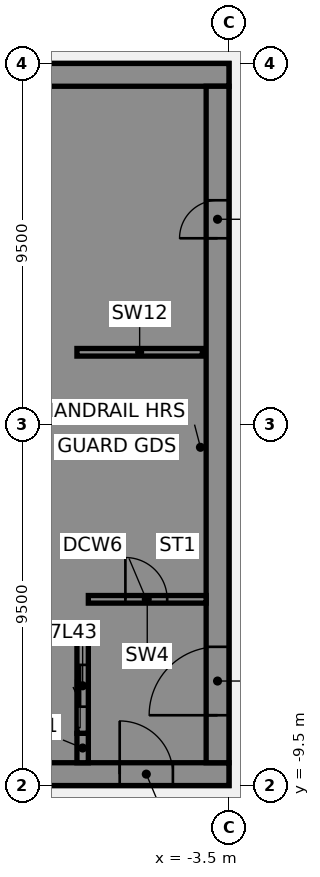
"""IFC4 building model, lengths in metres.
Left out: names, types, materials, properties, quantities, classifications, styles, units other than length and angle.
Written with IfcOpenShell. Run it as: python <this file> out.ifc"""

import sys

from ifc_helpers import new_model, si_unit, direction, frame, frame_2d, origin, place, context, subcontext, project, spatial, polyline, rectangle, outline, extrude, element, fill, save


model = new_model("IFC4")
c1 = context("Model", 3, precision=1e-05, world=origin(), true_north=direction((0.0, 1.0)))
c2 = subcontext(c1, "Body", "Model", "MODEL_VIEW")
j1 = project(units=[si_unit("LENGTHUNIT", "METRE"), si_unit("PLANEANGLEUNIT", "RADIAN")], contexts=[c1])
p1 = place(None, origin())
s1 = spatial("IfcSite", under=j1, at=p1, CompositionType="ELEMENT")
p2 = place(p1, origin())
s2 = spatial("IfcBuilding", under=s1, at=p2, CompositionType="ELEMENT")
p3 = place(p2, frame((0.0, 0.0, 174.25)))
s3 = spatial("IfcBuildingStorey", under=s2, at=p3, CompositionType="ELEMENT", Elevation=174.25)
p4 = place(p3, frame((-16.5, -9.2, 0.0), z_axis=(0.0, 0.0, 1.0), x_axis=(1.0, 0.0, 0.0)))
e1 = element("IfcWall", 1, at=p4, inside=s3, PredefinedType="SHEAR", context=c2, shape_type="SweptSolid", body=[
    extrude(rectangle(XDim=13.0, YDim=0.6, at=frame_2d((6.5, 0.0))), origin(), (0.0, 0.0, 1.0), 3.57),
])
p5 = place(p4, frame((4.15, 0.0, 0.0)))
e2 = element("IfcOpeningElement", 2, at=p5, cuts=e1, PredefinedType="OPENING", context=c2, shape_type="SweptSolid", body=[
    extrude(rectangle(XDim=1.4, YDim=2.1, at=frame_2d((0.7, 1.05))), frame((0.0, 0.31, 0.0), z_axis=(0.0, -1.0, 0.0), x_axis=(1.0, 0.0, 0.0)), (0.0, 0.0, 1.0), 0.62),
])
p6 = place(p4, frame((10.125, 0.0, 0.0)))
e3 = element("IfcOpeningElement", 3, at=p6, cuts=e1, PredefinedType="OPENING", context=c2, shape_type="SweptSolid", body=[
    extrude(rectangle(XDim=1.4, YDim=2.1, at=frame_2d((0.7, 1.05))), frame((0.0, 0.31, 0.0), z_axis=(0.0, -1.0, 0.0), x_axis=(1.0, 0.0, 0.0)), (0.0, 0.0, 1.0), 0.62),
])
p7 = place(p3, frame((-16.5, 9.2, 0.0), z_axis=(0.0, 0.0, 1.0), x_axis=(1.0, 0.0, 0.0)))
e4 = element("IfcWall", 4, at=p7, inside=s3, PredefinedType="SHEAR", context=c2, shape_type="SweptSolid", body=[
    extrude(rectangle(XDim=13.0, YDim=0.6, at=frame_2d((6.5, 0.0))), origin(), (0.0, 0.0, 1.0), 3.57),
])
p8 = place(p3, origin())
e5 = element("IfcWall", 5, at=p8, inside=s3, PredefinedType="SHEAR", context=c2, shape_type="SweptSolid", body=[
    extrude(outline(polyline([(-9.8, -5.375), (-9.8, -5.625), (-7.5, -5.625), (-7.2, -5.625), (-7.2, 8.9), (-7.5, 8.9), (-9.8, 8.9), (-9.8, 8.125), (-7.5, 8.125), (-7.5, 5.625), (-9.8, 5.625), (-9.8, 5.375), (-7.5, 5.375), (-7.5, 2.875), (-9.8, 2.875), (-9.8, 2.625), (-7.5, 2.625), (-7.5, 0.125), (-9.8, 0.125), (-9.8, -0.125), (-7.5, -0.125), (-7.5, -2.625), (-9.8, -2.625), (-9.8, -2.875), (-7.5, -2.875), (-7.5, -5.375), (-9.8, -5.375)])), origin(), (0.0, 0.0, 1.0), 3.57),
])
p9 = place(p3, origin())
e6 = element("IfcWall", 6, at=p9, inside=s3, PredefinedType="SHEAR", context=c2, shape_type="SweptSolid", body=[
    extrude(outline(polyline([(-7.5, -8.125), (-9.55, -8.125), (-9.55, -5.625), (-9.8, -5.625), (-9.8, -8.125), (-9.8, -8.9), (-7.5, -8.9), (-7.5, -8.125)])), origin(), (0.0, 0.0, 1.0), 3.57),
])
p10 = place(p3, frame((-7.35, -8.9, 0.0), z_axis=(0.0, 0.0, 1.0), x_axis=(0.0, 1.0, 0.0)))
e7 = element("IfcWall", 7, at=p10, inside=s3, PredefinedType="SHEAR", context=c2, shape_type="SweptSolid", body=[
    extrude(rectangle(XDim=0.775, YDim=0.3, at=frame_2d((0.387, 0.0))), origin(), (0.0, 0.0, 1.0), 3.57),
])
p11 = place(p3, frame((-7.5, 1.9, 0.0), z_axis=(0.0, 0.0, 1.0), x_axis=(1.0, 0.0, 0.0)))
e8 = element("IfcWall", 8, at=p11, inside=s3, PredefinedType="SHEAR", context=c2, shape_type="SweptSolid", body=[
    extrude(rectangle(XDim=3.3, YDim=0.2, at=frame_2d((1.65, 0.0))), origin(), (0.0, 0.0, 1.0), 3.57),
])
p12 = place(p3, frame((-7.35, -8.125, 0.0), z_axis=(0.0, 0.0, 1.0), x_axis=(0.0, 1.0, 0.0)))
e9 = element("IfcWall", 9, at=p12, inside=s3, PredefinedType="SHEAR", context=c2, shape_type="SweptSolid", body=[
    extrude(rectangle(XDim=2.5, YDim=0.3, at=frame_2d((1.25, 0.0))), origin(), (0.0, 0.0, 1.0), 3.57),
])
p13 = place(p12, frame((0.7, 0.0, 0.0)))
e10 = element("IfcOpeningElement", 10, at=p13, cuts=e9, PredefinedType="OPENING", context=c2, shape_type="SweptSolid", body=[
    extrude(rectangle(XDim=1.1, YDim=2.1, at=frame_2d((0.55, 1.05))), frame((0.0, 0.16, 0.0), z_axis=(0.0, -1.0, 0.0), x_axis=(1.0, 0.0, 0.0)), (0.0, 0.0, 1.0), 0.32),
])
p14 = place(p3, frame((-3.8, -8.9, 0.0), z_axis=(0.0, 0.0, 1.0), x_axis=(0.0, 1.0, 0.0)))
e11 = element("IfcWall", 11, at=p14, inside=s3, PredefinedType="SHEAR", context=c2, shape_type="SweptSolid", body=[
    extrude(rectangle(XDim=17.8, YDim=0.6, at=frame_2d((8.9, 0.0))), origin(), (0.0, 0.0, 1.0), 3.57),
])
p15 = place(p14, frame((1.25, 0.0, 0.0)))
e12 = element("IfcOpeningElement", 12, at=p15, cuts=e11, PredefinedType="OPENING", context=c2, shape_type="SweptSolid", body=[
    extrude(rectangle(XDim=1.8, YDim=2.1, at=frame_2d((0.9, 1.05))), frame((0.0, 0.31, 0.0), z_axis=(0.0, -1.0, 0.0), x_axis=(1.0, 0.0, 0.0)), (0.0, 0.0, 1.0), 0.62),
])
p16 = place(p14, frame((13.8, 0.0, 0.0)))
e13 = element("IfcOpeningElement", 13, at=p16, cuts=e11, PredefinedType="OPENING", context=c2, shape_type="SweptSolid", body=[
    extrude(rectangle(XDim=1.0, YDim=2.1, at=frame_2d((0.5, 1.05))), frame((0.0, 0.31, 0.0), z_axis=(0.0, -1.0, 0.0), x_axis=(1.0, 0.0, 0.0)), (0.0, 0.0, 1.0), 0.62),
])
p17 = place(p3, frame((-7.2, -4.6, 0.0), z_axis=(0.0, 0.0, 1.0), x_axis=(1.0, 0.0, 0.0)))
e14 = element("IfcWall", 14, at=p17, inside=s3, PredefinedType="SHEAR", context=c2, shape_type="SweptSolid", body=[
    extrude(rectangle(XDim=3.1, YDim=0.2, at=frame_2d((1.55, 0.0))), origin(), (0.0, 0.0, 1.0), 3.57),
])
p18 = place(p17, frame((0.975, 0.0, 0.0)))
e15 = element("IfcOpeningElement", 15, at=p18, cuts=e14, PredefinedType="OPENING", context=c2, shape_type="SweptSolid", body=[
    extrude(rectangle(XDim=1.1, YDim=2.1, at=frame_2d((0.55, 1.05))), frame((0.0, 0.11, 0.0), z_axis=(0.0, -1.0, 0.0), x_axis=(1.0, 0.0, 0.0)), (0.0, 0.0, 1.0), 0.22),
])
p19 = place(p6, origin())
e16 = element("IfcDoor", 16, at=p19, inside=s3, OperationType="SINGLE_SWING_LEFT", PredefinedType="DOOR", context=c2, shape_type="SweptSolid", body=[
    extrude(rectangle(XDim=1.4, YDim=2.1, at=frame_2d((0.7, 1.05))), frame((0.0, 0.025, 0.0), z_axis=(0.0, -1.0, 0.0), x_axis=(1.0, 0.0, 0.0)), (0.0, 0.0, 1.0), 0.05),
])
fill(e3, e16)
p20 = place(p15, origin())
e17 = element("IfcDoor", 17, at=p20, inside=s3, OperationType="SINGLE_SWING_LEFT", PredefinedType="DOOR", context=c2, shape_type="SweptSolid", body=[
    extrude(rectangle(XDim=1.8, YDim=2.1, at=frame_2d((0.9, 1.05))), frame((0.0, 0.025, 0.0), z_axis=(0.0, -1.0, 0.0), x_axis=(1.0, 0.0, 0.0)), (0.0, 0.0, 1.0), 0.05),
])
fill(e12, e17)
p21 = place(p16, origin())
e18 = element("IfcDoor", 18, at=p21, inside=s3, OperationType="SINGLE_SWING_LEFT", PredefinedType="DOOR", context=c2, shape_type="SweptSolid", body=[
    extrude(rectangle(XDim=1.0, YDim=2.1, at=frame_2d((0.5, 1.05))), frame((0.0, 0.025, 0.0), z_axis=(0.0, -1.0, 0.0), x_axis=(1.0, 0.0, 0.0)), (0.0, 0.0, 1.0), 0.05),
])
fill(e13, e18)
p22 = place(p18, origin())
e19 = element("IfcDoor", 19, at=p22, inside=s3, OperationType="SINGLE_SWING_LEFT", PredefinedType="DOOR", context=c2, shape_type="SweptSolid", body=[
    extrude(rectangle(XDim=1.1, YDim=2.1, at=frame_2d((0.55, 1.05))), frame((0.0, 0.025, 0.0), z_axis=(0.0, -1.0, 0.0), x_axis=(1.0, 0.0, 0.0)), (0.0, 0.0, 1.0), 0.05),
])
fill(e15, e19)
p23 = place(p13, origin())
e20 = element("IfcDoor", 20, at=p23, inside=s3, OperationType="SLIDING_TO_LEFT", PredefinedType="DOOR", context=c2, shape_type="SweptSolid", body=[
    extrude(rectangle(XDim=1.1, YDim=2.1, at=frame_2d((0.55, 1.05))), frame((0.0, 0.025, 0.0), z_axis=(0.0, -1.0, 0.0), x_axis=(1.0, 0.0, 0.0)), (0.0, 0.0, 1.0), 0.05),
])
fill(e10, e20)
save(model, sys.argv[1])
